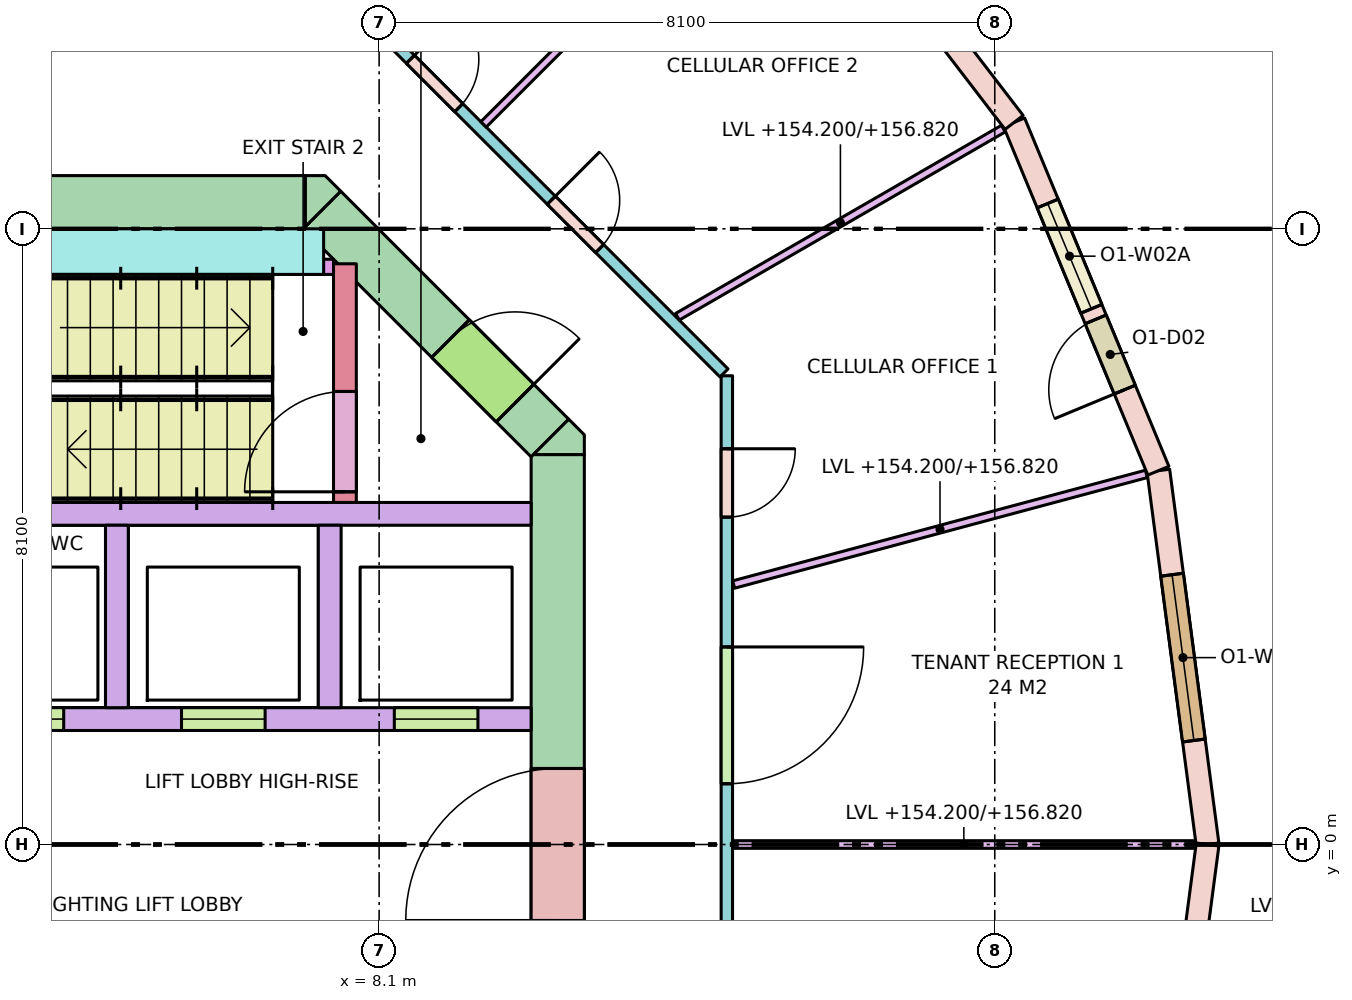
"""IFC4 building model, lengths in metres.
Left out: names, types, materials, properties, quantities, classifications, styles, units other than length and angle.
Written with IfcOpenShell. Run it as: python <this file> out.ifc"""

import sys

from ifc_helpers import new_model, si_unit, direction, frame, frame_2d, origin, place, context, subcontext, project, spatial, polyline, rectangle, outline, extrude, element, fill, save


model = new_model("IFC4")
c1 = context("Model", 3, precision=1e-05, world=origin(), true_north=direction((0.0, 1.0)))
c2 = subcontext(c1, "Body", "Model", "MODEL_VIEW")
j1 = project(units=[si_unit("LENGTHUNIT", "METRE"), si_unit("PLANEANGLEUNIT", "RADIAN")], contexts=[c1])
p1 = place(None, origin())
s1 = spatial("IfcSite", under=j1, at=p1, CompositionType="ELEMENT")
p2 = place(p1, origin())
s2 = spatial("IfcBuilding", under=s1, at=p2, CompositionType="ELEMENT")
p3 = place(p2, frame((0.0, 0.0, 154.2)))
s3 = spatial("IfcBuildingStorey", under=s2, at=p3, CompositionType="ELEMENT", Elevation=154.2)
p4 = place(p3, frame((-7.13, 8.45, -0.28), z_axis=(0.0, 0.0, 1.0), x_axis=(1.0, 0.0, 0.0)))
e1 = element("IfcWall", 1, at=p4, inside=s3, PredefinedType="SHEAR", context=c2, shape_type="SweptSolid", body=[
    extrude(rectangle(XDim=14.26, YDim=0.7, at=frame_2d((7.13, 0.0))), origin(), (0.0, 0.0, 1.0), 3.7),
])
p5 = place(p4, frame((5.48, 0.0, 0.28)))
e2 = element("IfcOpeningElement", 2, at=p5, cuts=e1, PredefinedType="OPENING", context=c2, shape_type="SweptSolid", body=[
    extrude(rectangle(XDim=0.7, YDim=2.1, at=frame_2d((0.35, 1.05))), frame((0.0, 0.36, 0.0), z_axis=(0.0, -1.0, 0.0), x_axis=(1.0, 0.0, 0.0)), (0.0, 0.0, 1.0), 0.72),
])
p6 = place(p4, frame((7.155, 0.0, 0.28)))
e3 = element("IfcOpeningElement", 3, at=p6, cuts=e1, PredefinedType="OPENING", context=c2, shape_type="SweptSolid", body=[
    extrude(rectangle(XDim=0.9, YDim=2.1, at=frame_2d((0.45, 1.05))), frame((0.0, 0.36, 0.0), z_axis=(0.0, -1.0, 0.0), x_axis=(1.0, 0.0, 0.0)), (0.0, 0.0, 1.0), 0.72),
])
p7 = place(p3, frame((10.45, -5.13, -0.28), z_axis=(0.0, 0.0, 1.0), x_axis=(0.0, 1.0, 0.0)))
e4 = element("IfcWall", 4, at=p7, inside=s3, PredefinedType="SHEAR", context=c2, shape_type="SweptSolid", body=[
    extrude(rectangle(XDim=10.26, YDim=0.7, at=frame_2d((5.13, 0.0))), origin(), (0.0, 0.0, 1.0), 3.7),
])
p8 = place(p7, frame((4.13, 0.0, 0.28)))
e5 = element("IfcOpeningElement", 5, at=p8, cuts=e4, PredefinedType="OPENING", context=c2, shape_type="SweptSolid", body=[
    extrude(rectangle(XDim=2.0, YDim=2.1, at=frame_2d((1.0, 1.05))), frame((0.0, 0.36, 0.0), z_axis=(0.0, -1.0, 0.0), x_axis=(1.0, 0.0, 0.0)), (0.0, 0.0, 1.0), 0.72),
])
p9 = place(p3, frame((7.347, 8.347, -0.28), z_axis=(0.0, 0.0, 1.0), x_axis=(0.707106781187, -0.707106781187, 0.0)))
e6 = element("IfcWall", 6, at=p9, inside=s3, PredefinedType="SHEAR", context=c2, shape_type="SweptSolid", body=[
    extrude(rectangle(XDim=4.243, YDim=0.7, at=frame_2d((2.121, 0.0))), origin(), (0.0, 0.0, 1.0), 3.7),
])
p10 = place(p9, frame((2.393, 0.0, 0.28)))
e7 = element("IfcOpeningElement", 7, at=p10, cuts=e6, PredefinedType="OPENING", context=c2, shape_type="SweptSolid", body=[
    extrude(rectangle(XDim=1.2, YDim=2.1, at=frame_2d((0.6, 1.05))), frame((0.0, 0.36, 0.0), z_axis=(0.0, -1.0, 0.0), x_axis=(1.0, 0.0, 0.0)), (0.0, 0.0, 1.0), 0.72),
])
p11 = place(p3, frame((0.0, 0.0, -0.28)))
e8 = element("IfcWall", 8, at=p11, inside=s3, PredefinedType="SHEAR", context=c2, shape_type="SweptSolid", body=[
    extrude(outline(polyline([(10.8, 5.39), (10.8, 5.13), (10.8, 5.13), (10.13, 5.13), (10.595, 5.595), (10.595, 5.595), (10.595, 5.595), (10.8, 5.39)])), origin(), (0.0, 0.0, 1.0), 3.7),
])
p12 = place(p3, frame((0.0, 0.0, -0.28)))
e9 = element("IfcWall", 9, at=p12, inside=s3, PredefinedType="SHEAR", context=c2, shape_type="SweptSolid", body=[
    extrude(outline(polyline([(7.39, 8.8), (7.595, 8.595), (7.595, 8.595), (7.595, 8.595), (7.13, 8.13), (7.13, 8.8), (7.13, 8.8), (7.39, 8.8)])), origin(), (0.0, 0.0, 1.0), 3.7),
])
p13 = place(p3, frame((2.0, 4.35, 0.0), z_axis=(0.0, 0.0, 1.0), x_axis=(1.0, 0.0, 0.0)))
e10 = element("IfcWall", 10, at=p13, inside=s3, PredefinedType="SOLIDWALL", context=c2, shape_type="SweptSolid", body=[
    extrude(rectangle(XDim=8.1, YDim=0.3, at=frame_2d((4.05, 0.0))), origin(), (0.0, 0.0, 1.0), 3.42),
])
p14 = place(p3, frame((2.0, 1.65, 0.0), z_axis=(0.0, 0.0, 1.0), x_axis=(1.0, 0.0, 0.0)))
e11 = element("IfcWall", 11, at=p14, inside=s3, PredefinedType="SOLIDWALL", context=c2, shape_type="SweptSolid", body=[
    extrude(rectangle(XDim=8.1, YDim=0.3, at=frame_2d((4.05, 0.0))), origin(), (0.0, 0.0, 1.0), 3.42),
])
p15 = place(p14, frame((0.85, 0.0, 0.0)))
e12 = element("IfcOpeningElement", 12, at=p15, cuts=e11, PredefinedType="OPENING", context=c2, shape_type="SweptSolid", body=[
    extrude(rectangle(XDim=1.1, YDim=2.1, at=frame_2d((0.55, 1.05))), frame((0.0, 0.16, 0.0), z_axis=(0.0, -1.0, 0.0), x_axis=(1.0, 0.0, 0.0)), (0.0, 0.0, 1.0), 0.32),
])
p16 = place(p14, frame((3.5, 0.0, 0.0)))
e13 = element("IfcOpeningElement", 13, at=p16, cuts=e11, PredefinedType="OPENING", context=c2, shape_type="SweptSolid", body=[
    extrude(rectangle(XDim=1.1, YDim=2.1, at=frame_2d((0.55, 1.05))), frame((0.0, 0.16, 0.0), z_axis=(0.0, -1.0, 0.0), x_axis=(1.0, 0.0, 0.0)), (0.0, 0.0, 1.0), 0.32),
])
p17 = place(p14, frame((6.3, 0.0, 0.0)))
e14 = element("IfcOpeningElement", 14, at=p17, cuts=e11, PredefinedType="OPENING", context=c2, shape_type="SweptSolid", body=[
    extrude(rectangle(XDim=1.1, YDim=2.1, at=frame_2d((0.55, 1.05))), frame((0.0, 0.16, 0.0), z_axis=(0.0, -1.0, 0.0), x_axis=(1.0, 0.0, 0.0)), (0.0, 0.0, 1.0), 0.32),
])
for number, where, z_axis, x_axis in (
    (15, (4.65, 1.8, 0.0), (0.0, 0.0, 1.0), (0.0, 1.0, 0.0)),
    (16, (7.45, 1.8, 0.0), (0.0, 0.0, 1.0), (0.0, 1.0, 0.0)),
):
    element("IfcWall", number, at=place(p3, frame(where, z_axis=z_axis, x_axis=x_axis)), inside=s3, PredefinedType="SOLIDWALL", context=c2, shape_type="SweptSolid", body=[
        extrude(rectangle(XDim=2.4, YDim=0.3, at=frame_2d((1.2, 0.0))), origin(), (0.0, 0.0, 1.0), 3.42),
    ])
p18 = place(p3, frame((7.65, 4.5, 0.0), z_axis=(0.0, 0.0, 1.0), x_axis=(0.0, 1.0, 0.0)))
e17 = element("IfcWall", 17, at=p18, inside=s3, PredefinedType="SHEAR", context=c2, shape_type="SweptSolid", body=[
    extrude(rectangle(XDim=3.14, YDim=0.3, at=frame_2d((1.57, 0.0))), origin(), (0.0, 0.0, 1.0), 3.42),
])
p19 = place(p18, frame((0.14, 0.0, 0.0)))
e18 = element("IfcOpeningElement", 18, at=p19, cuts=e17, PredefinedType="OPENING", context=c2, shape_type="SweptSolid", body=[
    extrude(rectangle(XDim=1.32, YDim=2.1, at=frame_2d((0.66, 1.05))), frame((0.0, 0.16, 0.0), z_axis=(0.0, -1.0, 0.0), x_axis=(1.0, 0.0, 0.0)), (0.0, 0.0, 1.0), 0.32),
])
p20 = place(p3, frame((2.0, 7.8, 0.0), z_axis=(0.0, 0.0, 1.0), x_axis=(1.0, 0.0, 0.0)))
e19 = element("IfcWall", 19, at=p20, inside=s3, PredefinedType="SHEAR", context=c2, shape_type="SweptSolid", body=[
    extrude(rectangle(XDim=5.37, YDim=0.6, at=frame_2d((2.685, 0.0))), origin(), (0.0, 0.0, 1.0), 3.42),
])
p21 = place(p3, frame((6.9, 7.6, 0.0), z_axis=(0.0, 0.0, 1.0), x_axis=(1.0, 0.0, 0.0)))
e20 = element("IfcWall", 20, at=p21, inside=s3, PredefinedType="SHEAR", context=c2, shape_type="SweptSolid", body=[
    extrude(rectangle(XDim=0.6, YDim=0.2, at=frame_2d((0.3, 0.0))), origin(), (0.0, 0.0, 1.0), 3.42),
])
p22 = place(p3, frame((19.0, 0.0, 0.0), z_axis=(0.0, 0.0, 1.0), x_axis=(-0.130538549191, 0.991443234469, 0.0)))
e21 = element("IfcWall", 21, at=p22, inside=s3, PredefinedType="STANDARD", context=c2, shape_type="SweptSolid", body=[
    extrude(rectangle(XDim=4.96, YDim=0.3, at=frame_2d((2.48, 0.0))), origin(), (0.0, 0.0, 1.0), 3.42),
])
p23 = place(p22, frame((1.38, 0.0, 0.8)))
e22 = element("IfcOpeningElement", 22, at=p23, cuts=e21, PredefinedType="OPENING", context=c2, shape_type="SweptSolid", body=[
    extrude(rectangle(XDim=2.2, YDim=2.4, at=frame_2d((1.1, 1.2))), frame((0.0, 0.16, 0.0), z_axis=(0.0, -1.0, 0.0), x_axis=(1.0, 0.0, 0.0)), (0.0, 0.0, 1.0), 0.32),
])
p24 = place(p3, frame((18.353, 4.917, 0.0), z_axis=(0.0, 0.0, 1.0), x_axis=(-0.382650301762, 0.923893254961, 0.0)))
e23 = element("IfcWall", 23, at=p24, inside=s3, PredefinedType="STANDARD", context=c2, shape_type="SweptSolid", body=[
    extrude(rectangle(XDim=4.96, YDim=0.3, at=frame_2d((2.48, 0.0))), origin(), (0.0, 0.0, 1.0), 3.42),
])
p25 = place(p24, frame((1.155, 0.0, 0.0)))
e24 = element("IfcOpeningElement", 24, at=p25, cuts=e23, PredefinedType="OPENING", context=c2, shape_type="SweptSolid", body=[
    extrude(rectangle(XDim=1.0, YDim=2.4, at=frame_2d((0.5, 1.2))), frame((0.0, 0.16, 0.0), z_axis=(0.0, -1.0, 0.0), x_axis=(1.0, 0.0, 0.0)), (0.0, 0.0, 1.0), 0.32),
])
p26 = place(p24, frame((2.305, 0.0, 0.8)))
e25 = element("IfcOpeningElement", 25, at=p26, cuts=e23, PredefinedType="OPENING", context=c2, shape_type="SweptSolid", body=[
    extrude(rectangle(XDim=1.5, YDim=2.4, at=frame_2d((0.75, 1.2))), frame((0.0, 0.16, 0.0), z_axis=(0.0, -1.0, 0.0), x_axis=(1.0, 0.0, 0.0)), (0.0, 0.0, 1.0), 0.32),
])
p27 = place(p3, frame((16.455, 9.5, 0.0), z_axis=(0.0, 0.0, 1.0), x_axis=(-0.608768356425, 0.793348024649, 0.0)))
e26 = element("IfcWall", 26, at=p27, inside=s3, PredefinedType="STANDARD", context=c2, shape_type="SweptSolid", body=[
    extrude(rectangle(XDim=4.96, YDim=0.3, at=frame_2d((2.48, 0.0))), origin(), (0.0, 0.0, 1.0), 3.42),
])
p28 = place(p27, frame((1.38, 0.0, 0.8)))
e27 = element("IfcOpeningElement", 27, at=p28, cuts=e26, PredefinedType="OPENING", context=c2, shape_type="SweptSolid", body=[
    extrude(rectangle(XDim=2.2, YDim=2.4, at=frame_2d((1.1, 1.2))), frame((0.0, 0.16, 0.0), z_axis=(0.0, -1.0, 0.0), x_axis=(1.0, 0.0, 0.0)), (0.0, 0.0, 1.0), 0.32),
])
p29 = place(p3, frame((18.353, -4.917, 0.0), z_axis=(0.0, 0.0, 1.0), x_axis=(0.130538549191, 0.991443234469, 0.0)))
e28 = element("IfcWall", 28, at=p29, inside=s3, PredefinedType="STANDARD", context=c2, shape_type="SweptSolid", body=[
    extrude(rectangle(XDim=4.96, YDim=0.3, at=frame_2d((2.48, 0.0))), origin(), (0.0, 0.0, 1.0), 3.42),
])
p30 = place(p29, frame((1.155, 0.0, 0.0)))
e29 = element("IfcOpeningElement", 29, at=p30, cuts=e28, PredefinedType="OPENING", context=c2, shape_type="SweptSolid", body=[
    extrude(rectangle(XDim=1.0, YDim=2.4, at=frame_2d((0.5, 1.2))), frame((0.0, 0.16, 0.0), z_axis=(0.0, -1.0, 0.0), x_axis=(1.0, 0.0, 0.0)), (0.0, 0.0, 1.0), 0.32),
])
p31 = place(p29, frame((2.305, 0.0, 0.8)))
e30 = element("IfcOpeningElement", 30, at=p31, cuts=e28, PredefinedType="OPENING", context=c2, shape_type="SweptSolid", body=[
    extrude(rectangle(XDim=1.5, YDim=2.4, at=frame_2d((0.75, 1.2))), frame((0.0, 0.16, 0.0), z_axis=(0.0, -1.0, 0.0), x_axis=(1.0, 0.0, 0.0)), (0.0, 0.0, 1.0), 0.32),
])
p32 = place(p3, frame((8.204, 10.638, 0.0), z_axis=(0.0, 0.0, 1.0), x_axis=(0.707106781187, -0.707106781187, 0.0)))
e31 = element("IfcWall", 31, at=p32, inside=s3, PredefinedType="PARTITIONING", context=c2, shape_type="SweptSolid", body=[
    extrude(rectangle(XDim=6.271, YDim=0.15, at=frame_2d((3.135, 0.0))), origin(), (0.0, 0.0, 1.0), 2.62),
])
p33 = place(p32, frame((3.057, 0.0, 0.0)))
e32 = element("IfcOpeningElement", 32, at=p33, cuts=e31, PredefinedType="OPENING", context=c2, shape_type="SweptSolid", body=[
    extrude(rectangle(XDim=0.9, YDim=2.1, at=frame_2d((0.45, 1.05))), frame((0.0, 0.085, 0.0), z_axis=(0.0, -1.0, 0.0), x_axis=(1.0, 0.0, 0.0)), (0.0, 0.0, 1.0), 0.17),
])
p34 = place(p32, frame((0.436, 0.0, 0.0)))
e33 = element("IfcOpeningElement", 33, at=p34, cuts=e31, PredefinedType="OPENING", context=c2, shape_type="SweptSolid", body=[
    extrude(rectangle(XDim=0.9, YDim=2.1, at=frame_2d((0.45, 1.05))), frame((0.0, 0.085, 0.0), z_axis=(0.0, -1.0, 0.0), x_axis=(1.0, 0.0, 0.0)), (0.0, 0.0, 1.0), 0.17),
])
p35 = place(p3, frame((12.675, 6.167, 0.0), z_axis=(0.0, 0.0, 1.0), x_axis=(0.0, -1.0, 0.0)))
e34 = element("IfcWall", 34, at=p35, inside=s3, PredefinedType="PARTITIONING", context=c2, shape_type="SweptSolid", body=[
    extrude(rectangle(XDim=12.333, YDim=0.15, at=frame_2d((6.167, 0.0))), origin(), (0.0, 0.0, 1.0), 2.62),
])
p36 = place(p35, frame((3.568, 0.0, 0.0)))
e35 = element("IfcOpeningElement", 35, at=p36, cuts=e34, PredefinedType="OPENING", context=c2, shape_type="SweptSolid", body=[
    extrude(rectangle(XDim=1.8, YDim=2.1, at=frame_2d((0.9, 1.05))), frame((0.0, 0.085, 0.0), z_axis=(0.0, -1.0, 0.0), x_axis=(1.0, 0.0, 0.0)), (0.0, 0.0, 1.0), 0.17),
])
p37 = place(p35, frame((0.96, 0.0, 0.0)))
e36 = element("IfcOpeningElement", 36, at=p37, cuts=e34, PredefinedType="OPENING", context=c2, shape_type="SweptSolid", body=[
    extrude(rectangle(XDim=0.9, YDim=2.1, at=frame_2d((0.45, 1.05))), frame((0.0, 0.085, 0.0), z_axis=(0.0, -1.0, 0.0), x_axis=(1.0, 0.0, 0.0)), (0.0, 0.0, 1.0), 0.17),
])
p38 = place(p35, frame((10.473, 0.0, 0.0)))
e37 = element("IfcOpeningElement", 37, at=p38, cuts=e34, PredefinedType="OPENING", context=c2, shape_type="SweptSolid", body=[
    extrude(rectangle(XDim=0.9, YDim=2.1, at=frame_2d((0.45, 1.05))), frame((0.0, 0.085, 0.0), z_axis=(0.0, -1.0, 0.0), x_axis=(1.0, 0.0, 0.0)), (0.0, 0.0, 1.0), 0.17),
])
p39 = place(p35, frame((7.416, 0.0, 0.0)))
e38 = element("IfcOpeningElement", 38, at=p39, cuts=e34, PredefinedType="OPENING", context=c2, shape_type="SweptSolid", body=[
    extrude(rectangle(XDim=0.9, YDim=2.1, at=frame_2d((0.45, 1.05))), frame((0.0, 0.085, 0.0), z_axis=(0.0, -1.0, 0.0), x_axis=(1.0, 0.0, 0.0)), (0.0, 0.0, 1.0), 0.17),
])
p40 = place(p3, frame((12.75, 0.0, 0.0), z_axis=(0.0, 0.0, 1.0), x_axis=(1.0, 0.0, 0.0)))
e39 = element("IfcWall", 39, at=p40, inside=s3, PredefinedType="PARTITIONING", context=c2, shape_type="SweptSolid", body=[
    extrude(rectangle(XDim=6.087, YDim=0.1, at=frame_2d((3.043, 0.0))), origin(), (0.0, 0.0, 1.0), 2.62),
])
p41 = place(p3, frame((12.764, 3.42, 0.0), z_axis=(0.0, 0.0, 1.0), x_axis=(0.965925759926, 0.258819292773, 0.0)))
e40 = element("IfcWall", 40, at=p41, inside=s3, PredefinedType="PARTITIONING", context=c2, shape_type="SweptSolid", body=[
    extrude(rectangle(XDim=5.622, YDim=0.1, at=frame_2d((2.811, 0.0))), origin(), (0.0, 0.0, 1.0), 2.62),
])
p42 = place(p3, frame((12.025, 6.943, 0.0), z_axis=(0.0, 0.0, 1.0), x_axis=(0.866025463095, 0.499999897272, 0.0)))
e41 = element("IfcWall", 41, at=p42, inside=s3, PredefinedType="PARTITIONING", context=c2, shape_type="SweptSolid", body=[
    extrude(rectangle(XDim=4.951, YDim=0.1, at=frame_2d((2.476, 0.0))), origin(), (0.0, 0.0, 1.0), 2.62),
])
p43 = place(p3, frame((9.474, 9.474, 0.0), z_axis=(0.0, 0.0, 1.0), x_axis=(0.707106781187, 0.707106781187, 0.0)))
e42 = element("IfcWall", 42, at=p43, inside=s3, PredefinedType="PARTITIONING", context=c2, shape_type="SweptSolid", body=[
    extrude(rectangle(XDim=5.439, YDim=0.1, at=frame_2d((2.719, 0.0))), origin(), (0.0, 0.0, 1.0), 2.62),
])
p44 = place(p23, origin())
e43 = element("IfcWindow", 43, at=p44, inside=s3, PartitioningType="SINGLE_PANEL", PredefinedType="WINDOW", context=c2, shape_type="SweptSolid", body=[
    extrude(rectangle(XDim=2.2, YDim=2.4, at=frame_2d((1.1, 1.2))), frame((0.0, 0.03, 0.0), z_axis=(0.0, -1.0, 0.0), x_axis=(1.0, 0.0, 0.0)), (0.0, 0.0, 1.0), 0.06),
])
fill(e22, e43)
p45 = place(p25, origin())
e44 = element("IfcDoor", 44, at=p45, inside=s3, OperationType="SINGLE_SWING_LEFT", PredefinedType="DOOR", context=c2, shape_type="SweptSolid", body=[
    extrude(rectangle(XDim=1.0, YDim=2.4, at=frame_2d((0.5, 1.2))), frame((0.0, 0.025, 0.0), z_axis=(0.0, -1.0, 0.0), x_axis=(1.0, 0.0, 0.0)), (0.0, 0.0, 1.0), 0.05),
])
fill(e24, e44)
p46 = place(p26, origin())
e45 = element("IfcWindow", 45, at=p46, inside=s3, PartitioningType="SINGLE_PANEL", PredefinedType="WINDOW", context=c2, shape_type="SweptSolid", body=[
    extrude(rectangle(XDim=1.5, YDim=2.4, at=frame_2d((0.75, 1.2))), frame((0.0, 0.03, 0.0), z_axis=(0.0, -1.0, 0.0), x_axis=(1.0, 0.0, 0.0)), (0.0, 0.0, 1.0), 0.06),
])
fill(e25, e45)
p47 = place(p15, origin())
e46 = element("IfcDoor", 46, at=p47, inside=s3, OperationType="DOUBLE_DOOR_SLIDING", PredefinedType="DOOR", context=c2, shape_type="SweptSolid", body=[
    extrude(rectangle(XDim=1.1, YDim=2.1, at=frame_2d((0.55, 1.05))), frame((0.0, 0.025, 0.0), z_axis=(0.0, -1.0, 0.0), x_axis=(1.0, 0.0, 0.0)), (0.0, 0.0, 1.0), 0.05),
])
fill(e12, e46)
p48 = place(p16, origin())
e47 = element("IfcDoor", 47, at=p48, inside=s3, OperationType="DOUBLE_DOOR_SLIDING", PredefinedType="DOOR", context=c2, shape_type="SweptSolid", body=[
    extrude(rectangle(XDim=1.1, YDim=2.1, at=frame_2d((0.55, 1.05))), frame((0.0, 0.025, 0.0), z_axis=(0.0, -1.0, 0.0), x_axis=(1.0, 0.0, 0.0)), (0.0, 0.0, 1.0), 0.05),
])
fill(e13, e47)
p49 = place(p17, origin())
e48 = element("IfcDoor", 48, at=p49, inside=s3, OperationType="DOUBLE_DOOR_SLIDING", PredefinedType="DOOR", context=c2, shape_type="SweptSolid", body=[
    extrude(rectangle(XDim=1.1, YDim=2.1, at=frame_2d((0.55, 1.05))), frame((0.0, 0.025, 0.0), z_axis=(0.0, -1.0, 0.0), x_axis=(1.0, 0.0, 0.0)), (0.0, 0.0, 1.0), 0.05),
])
fill(e14, e48)
p50 = place(p19, origin())
e49 = element("IfcDoor", 49, at=p50, inside=s3, OperationType="DOUBLE_DOOR_SINGLE_SWING", PredefinedType="DOOR", context=c2, shape_type="SweptSolid", body=[
    extrude(rectangle(XDim=1.32, YDim=2.1, at=frame_2d((0.66, 1.05))), frame((0.0, 0.025, 0.0), z_axis=(0.0, -1.0, 0.0), x_axis=(1.0, 0.0, 0.0)), (0.0, 0.0, 1.0), 0.05),
])
fill(e18, e49)
p51 = place(p10, origin())
e50 = element("IfcDoor", 50, at=p51, inside=s3, OperationType="SINGLE_SWING_RIGHT", PredefinedType="DOOR", context=c2, shape_type="SweptSolid", body=[
    extrude(rectangle(XDim=1.2, YDim=2.1, at=frame_2d((0.6, 1.05))), frame((0.0, 0.025, 0.0), z_axis=(0.0, -1.0, 0.0), x_axis=(1.0, 0.0, 0.0)), (0.0, 0.0, 1.0), 0.05),
])
fill(e7, e50)
p52 = place(p8, origin())
e51 = element("IfcDoor", 51, at=p52, inside=s3, OperationType="DOUBLE_DOOR_SINGLE_SWING", PredefinedType="DOOR", context=c2, shape_type="SweptSolid", body=[
    extrude(rectangle(XDim=2.0, YDim=2.1, at=frame_2d((1.0, 1.05))), frame((0.0, 0.025, 0.0), z_axis=(0.0, -1.0, 0.0), x_axis=(1.0, 0.0, 0.0)), (0.0, 0.0, 1.0), 0.05),
])
fill(e5, e51)
p53 = place(p36, origin())
e52 = element("IfcDoor", 52, at=p53, inside=s3, OperationType="DOUBLE_DOOR_SINGLE_SWING", PredefinedType="DOOR", context=c2, shape_type="SweptSolid", body=[
    extrude(rectangle(XDim=1.8, YDim=2.1, at=frame_2d((0.9, 1.05))), frame((0.0, 0.025, 0.0), z_axis=(0.0, -1.0, 0.0), x_axis=(1.0, 0.0, 0.0)), (0.0, 0.0, 1.0), 0.05),
])
fill(e35, e52)
p54 = place(p37, origin())
e53 = element("IfcDoor", 53, at=p54, inside=s3, OperationType="SINGLE_SWING_LEFT", PredefinedType="DOOR", context=c2, shape_type="SweptSolid", body=[
    extrude(rectangle(XDim=0.9, YDim=2.1, at=frame_2d((0.45, 1.05))), frame((0.0, 0.025, 0.0), z_axis=(0.0, -1.0, 0.0), x_axis=(1.0, 0.0, 0.0)), (0.0, 0.0, 1.0), 0.05),
])
fill(e36, e53)
p55 = place(p33, origin())
e54 = element("IfcDoor", 54, at=p55, inside=s3, OperationType="SINGLE_SWING_LEFT", PredefinedType="DOOR", context=c2, shape_type="SweptSolid", body=[
    extrude(rectangle(XDim=0.9, YDim=2.1, at=frame_2d((0.45, 1.05))), frame((0.0, 0.025, 0.0), z_axis=(0.0, -1.0, 0.0), x_axis=(1.0, 0.0, 0.0)), (0.0, 0.0, 1.0), 0.05),
])
fill(e32, e54)
p56 = place(p34, origin())
e55 = element("IfcDoor", 55, at=p56, inside=s3, OperationType="SINGLE_SWING_LEFT", PredefinedType="DOOR", context=c2, shape_type="SweptSolid", body=[
    extrude(rectangle(XDim=0.9, YDim=2.1, at=frame_2d((0.45, 1.05))), frame((0.0, 0.025, 0.0), z_axis=(0.0, -1.0, 0.0), x_axis=(1.0, 0.0, 0.0)), (0.0, 0.0, 1.0), 0.05),
])
fill(e33, e55)
save(model, sys.argv[1])
